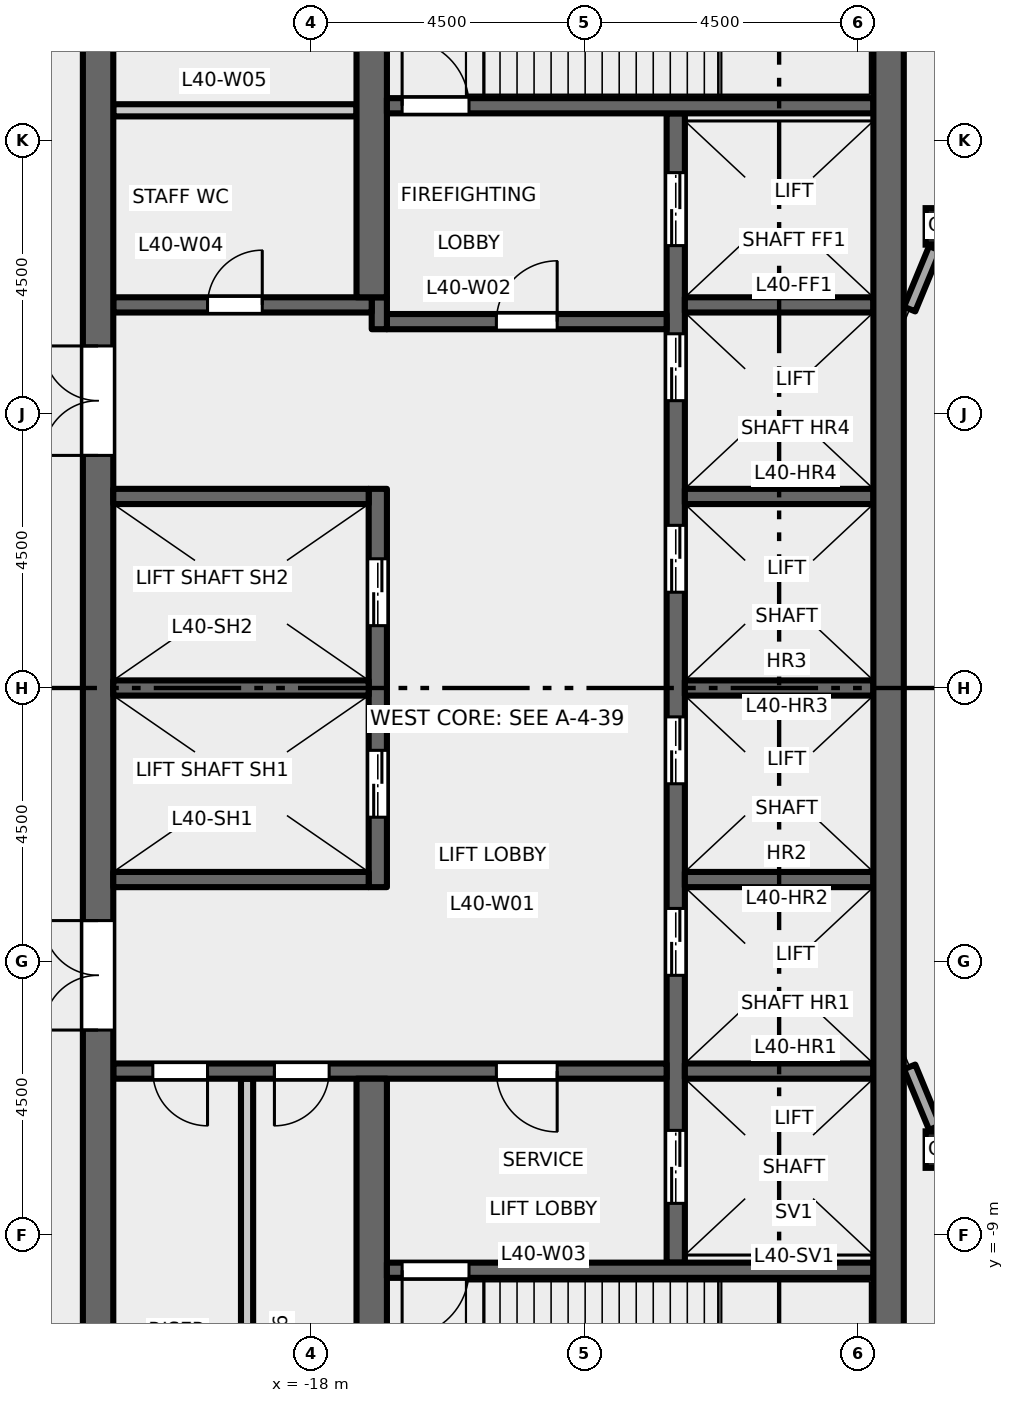
"""IFC4 building model, lengths in metres.
Left out: names, types, materials, properties, quantities, classifications, styles, units other than length and angle.
Written with IfcOpenShell. Run it as: python <this file> out.ifc"""

import sys

from ifc_helpers import new_model, si_unit, direction, frame, frame_2d, origin, origin_2d, place, context, subcontext, project, spatial, rectangle, hollow_rectangle, extrude, element, fill, save


model = new_model("IFC4")
c1 = context("Model", 3, precision=1e-05, world=origin(), true_north=direction((0.0, 1.0)))
c2 = subcontext(c1, "Body", "Model", "MODEL_VIEW")
j1 = project(units=[si_unit("LENGTHUNIT", "METRE"), si_unit("PLANEANGLEUNIT", "RADIAN")], contexts=[c1])
p1 = place(None, origin())
s1 = spatial("IfcSite", under=j1, at=p1, CompositionType="ELEMENT")
p2 = place(p1, origin())
s2 = spatial("IfcBuilding", under=s1, at=p2, CompositionType="ELEMENT")
p3 = place(p2, frame((0.0, 0.0, 187.2)))
s3 = spatial("IfcBuildingStorey", under=s2, at=p3, CompositionType="ELEMENT", Elevation=187.2)
for number, where, z_axis, x_axis in (
    (1, (-7.591, -7.591, 0.0), (0.0, 0.0, 1.0), (1.0, 0.0, 0.0)),
    (2, (-7.591, 7.591, 0.0), (0.0, 0.0, 1.0), (1.0, 0.0, 0.0)),
):
    element("IfcColumn", number, at=place(p3, frame(where, z_axis=z_axis, x_axis=x_axis)), inside=s3, PredefinedType="COLUMN", context=c2, shape_type="SweptSolid", body=[
        extrude(hollow_rectangle(XDim=0.6, YDim=0.6, WallThickness=0.032, at=origin_2d()), origin(), (0.0, 0.0, 1.0), 5.5),
    ])
p4 = place(p3, frame((-12.0, -9.45, 0.0), z_axis=(0.0, 0.0, 1.0), x_axis=(0.0, 1.0, 0.0)))
e3 = element("IfcWall", 3, at=p4, inside=s3, PredefinedType="SHEAR", context=c2, shape_type="SweptSolid", body=[
    extrude(rectangle(XDim=18.9, YDim=0.3, at=frame_2d((9.45, 0.0))), origin(), (0.0, 0.0, 1.0), 5.35),
])
p5 = place(p4, frame((4.725, 0.0, 0.0)))
e4 = element("IfcOpeningElement", 4, at=p5, cuts=e3, PredefinedType="OPENING", context=c2, shape_type="SweptSolid", body=[
    extrude(rectangle(XDim=1.1, YDim=2.1, at=frame_2d((0.55, 1.05))), frame((0.0, 0.16, 0.0), z_axis=(0.0, -1.0, 0.0), x_axis=(1.0, 0.0, 0.0)), (0.0, 0.0, 1.0), 0.32),
])
p6 = place(p4, frame((7.875, 0.0, 0.0)))
e5 = element("IfcOpeningElement", 5, at=p6, cuts=e3, PredefinedType="OPENING", context=c2, shape_type="SweptSolid", body=[
    extrude(rectangle(XDim=1.1, YDim=2.1, at=frame_2d((0.55, 1.05))), frame((0.0, 0.16, 0.0), z_axis=(0.0, -1.0, 0.0), x_axis=(1.0, 0.0, 0.0)), (0.0, 0.0, 1.0), 0.32),
])
p7 = place(p4, frame((11.025, 0.0, 0.0)))
e6 = element("IfcOpeningElement", 6, at=p7, cuts=e3, PredefinedType="OPENING", context=c2, shape_type="SweptSolid", body=[
    extrude(rectangle(XDim=1.1, YDim=2.1, at=frame_2d((0.55, 1.05))), frame((0.0, 0.16, 0.0), z_axis=(0.0, -1.0, 0.0), x_axis=(1.0, 0.0, 0.0)), (0.0, 0.0, 1.0), 0.32),
])
p8 = place(p4, frame((14.175, 0.0, 0.0)))
e7 = element("IfcOpeningElement", 7, at=p8, cuts=e3, PredefinedType="OPENING", context=c2, shape_type="SweptSolid", body=[
    extrude(rectangle(XDim=1.1, YDim=2.1, at=frame_2d((0.55, 1.05))), frame((0.0, 0.16, 0.0), z_axis=(0.0, -1.0, 0.0), x_axis=(1.0, 0.0, 0.0)), (0.0, 0.0, 1.0), 0.32),
])
p9 = place(p4, frame((16.725, 0.0, 0.0)))
e8 = element("IfcOpeningElement", 8, at=p9, cuts=e3, PredefinedType="OPENING", context=c2, shape_type="SweptSolid", body=[
    extrude(rectangle(XDim=1.2, YDim=2.1, at=frame_2d((0.6, 1.05))), frame((0.0, 0.16, 0.0), z_axis=(0.0, -1.0, 0.0), x_axis=(1.0, 0.0, 0.0)), (0.0, 0.0, 1.0), 0.32),
])
p10 = place(p4, frame((0.975, 0.0, 0.0)))
e9 = element("IfcOpeningElement", 9, at=p10, cuts=e3, PredefinedType="OPENING", context=c2, shape_type="SweptSolid", body=[
    extrude(rectangle(XDim=1.2, YDim=2.1, at=frame_2d((0.6, 1.05))), frame((0.0, 0.16, 0.0), z_axis=(0.0, -1.0, 0.0), x_axis=(1.0, 0.0, 0.0)), (0.0, 0.0, 1.0), 0.32),
])
p11 = place(p3, frame((-12.15, 6.025, 0.0), z_axis=(0.0, 0.0, 1.0), x_axis=(-1.0, 0.0, 0.0)))
e10 = element("IfcWall", 10, at=p11, inside=s3, PredefinedType="SHEAR", context=c2, shape_type="SweptSolid", body=[
    extrude(rectangle(XDim=4.6, YDim=0.25, at=frame_2d((2.3, 0.0))), origin(), (0.0, 0.0, 1.0), 5.35),
])
p12 = place(p11, frame((1.8, 0.0, 0.0)))
e11 = element("IfcOpeningElement", 11, at=p12, cuts=e10, PredefinedType="OPENING", context=c2, shape_type="SweptSolid", body=[
    extrude(rectangle(XDim=1.0, YDim=2.1, at=frame_2d((0.5, 1.05))), frame((0.0, 0.135, 0.0), z_axis=(0.0, -1.0, 0.0), x_axis=(1.0, 0.0, 0.0)), (0.0, 0.0, 1.0), 0.27),
])
p13 = place(p3, frame((-16.875, 5.9, 0.0), z_axis=(0.0, 0.0, 1.0), x_axis=(0.0, 1.0, 0.0)))
e12 = element("IfcWall", 12, at=p13, inside=s3, PredefinedType="SHEAR", context=c2, shape_type="SweptSolid", body=[
    extrude(rectangle(XDim=0.525, YDim=0.25, at=frame_2d((0.263, 0.0))), origin(), (0.0, 0.0, 1.0), 5.35),
])
p14 = place(p3, frame((-17.0, 6.3, 0.0), z_axis=(0.0, 0.0, 1.0), x_axis=(-1.0, 0.0, 0.0)))
e13 = element("IfcWall", 13, at=p14, inside=s3, PredefinedType="SHEAR", context=c2, shape_type="SweptSolid", body=[
    extrude(rectangle(XDim=4.25, YDim=0.25, at=frame_2d((2.125, 0.0))), origin(), (0.0, 0.0, 1.0), 5.35),
])
p15 = place(p14, frame((1.8, 0.0, 0.0)))
e14 = element("IfcOpeningElement", 14, at=p15, cuts=e13, PredefinedType="OPENING", context=c2, shape_type="SweptSolid", body=[
    extrude(rectangle(XDim=0.9, YDim=2.1, at=frame_2d((0.45, 1.05))), frame((0.0, 0.135, 0.0), z_axis=(0.0, -1.0, 0.0), x_axis=(1.0, 0.0, 0.0)), (0.0, 0.0, 1.0), 0.27),
])
p16 = place(p3, frame((-12.15, -6.3, 0.0), z_axis=(0.0, 0.0, 1.0), x_axis=(-1.0, 0.0, 0.0)))
e15 = element("IfcWall", 15, at=p16, inside=s3, PredefinedType="SHEAR", context=c2, shape_type="SweptSolid", body=[
    extrude(rectangle(XDim=9.1, YDim=0.25, at=frame_2d((4.55, 0.0))), origin(), (0.0, 0.0, 1.0), 5.35),
])
p17 = place(p16, frame((1.8, 0.0, 0.0)))
e16 = element("IfcOpeningElement", 16, at=p17, cuts=e15, PredefinedType="OPENING", context=c2, shape_type="SweptSolid", body=[
    extrude(rectangle(XDim=1.0, YDim=2.1, at=frame_2d((0.5, 1.05))), frame((0.0, 0.135, 0.0), z_axis=(0.0, -1.0, 0.0), x_axis=(1.0, 0.0, 0.0)), (0.0, 0.0, 1.0), 0.27),
])
p18 = place(p16, frame((5.55, 0.0, 0.0)))
e17 = element("IfcOpeningElement", 17, at=p18, cuts=e15, PredefinedType="OPENING", context=c2, shape_type="SweptSolid", body=[
    extrude(rectangle(XDim=0.9, YDim=2.1, at=frame_2d((0.45, 1.05))), frame((0.0, 0.135, 0.0), z_axis=(0.0, -1.0, 0.0), x_axis=(1.0, 0.0, 0.0)), (0.0, 0.0, 1.0), 0.27),
])
p19 = place(p16, frame((7.55, 0.0, 0.0)))
e18 = element("IfcOpeningElement", 18, at=p19, cuts=e15, PredefinedType="OPENING", context=c2, shape_type="SweptSolid", body=[
    extrude(rectangle(XDim=0.9, YDim=2.1, at=frame_2d((0.45, 1.05))), frame((0.0, 0.135, 0.0), z_axis=(0.0, -1.0, 0.0), x_axis=(1.0, 0.0, 0.0)), (0.0, 0.0, 1.0), 0.27),
])
p20 = place(p3, frame((-21.5, -13.0, 0.0), z_axis=(0.0, 0.0, 1.0), x_axis=(0.0, 1.0, 0.0)))
e19 = element("IfcWall", 19, at=p20, inside=s3, PredefinedType="SHEAR", context=c2, shape_type="SweptSolid", body=[
    extrude(rectangle(XDim=26.0, YDim=0.5, at=frame_2d((13.0, 0.0))), origin(), (0.0, 0.0, 1.0), 5.35),
])
p21 = place(p20, frame((16.825, 0.0, 0.0)))
e20 = element("IfcOpeningElement", 20, at=p21, cuts=e19, PredefinedType="OPENING", context=c2, shape_type="SweptSolid", body=[
    extrude(rectangle(XDim=1.8, YDim=2.1, at=frame_2d((0.9, 1.05))), frame((0.0, 0.26, 0.0), z_axis=(0.0, -1.0, 0.0), x_axis=(1.0, 0.0, 0.0)), (0.0, 0.0, 1.0), 0.52),
])
p22 = place(p20, frame((7.375, 0.0, 0.0)))
e21 = element("IfcOpeningElement", 21, at=p22, cuts=e19, PredefinedType="OPENING", context=c2, shape_type="SweptSolid", body=[
    extrude(rectangle(XDim=1.8, YDim=2.1, at=frame_2d((0.9, 1.05))), frame((0.0, 0.26, 0.0), z_axis=(0.0, -1.0, 0.0), x_axis=(1.0, 0.0, 0.0)), (0.0, 0.0, 1.0), 0.52),
])
p23 = place(p20, frame((23.8, 0.0, 0.0)))
e22 = element("IfcOpeningElement", 22, at=p23, cuts=e19, PredefinedType="OPENING", context=c2, shape_type="SweptSolid", body=[
    extrude(rectangle(XDim=0.9, YDim=2.1, at=frame_2d((0.45, 1.05))), frame((0.0, 0.26, 0.0), z_axis=(0.0, -1.0, 0.0), x_axis=(1.0, 0.0, 0.0)), (0.0, 0.0, 1.0), 0.52),
])
p24 = place(p3, frame((-17.25, 9.5, 0.0), z_axis=(0.0, 0.0, 1.0), x_axis=(-1.0, 0.0, 0.0)))
e23 = element("IfcWall", 23, at=p24, inside=s3, PredefinedType="PARTITIONING", context=c2, shape_type="SweptSolid", body=[
    extrude(rectangle(XDim=4.0, YDim=0.2, at=frame_2d((2.0, 0.0))), origin(), (0.0, 0.0, 1.0), 5.35),
])
p25 = place(p3, frame((-19.05, -13.0, 0.0), z_axis=(0.0, 0.0, 1.0), x_axis=(0.0, 1.0, 0.0)))
e24 = element("IfcWall", 24, at=p25, inside=s3, PredefinedType="PARTITIONING", context=c2, shape_type="SweptSolid", body=[
    extrude(rectangle(XDim=6.575, YDim=0.2, at=frame_2d((3.288, 0.0))), origin(), (0.0, 0.0, 1.0), 5.35),
])
p26 = place(p3, frame((-16.9, -3.275, 0.0), z_axis=(0.0, 0.0, 1.0), x_axis=(0.0, 1.0, 0.0)))
e25 = element("IfcWall", 25, at=p26, inside=s3, PredefinedType="SHEAR", context=c2, shape_type="SweptSolid", body=[
    extrude(rectangle(XDim=6.55, YDim=0.3, at=frame_2d((3.275, 0.0))), origin(), (0.0, 0.0, 1.0), 5.35),
])
p27 = place(p26, frame((1.15, 0.0, 0.0)))
e26 = element("IfcOpeningElement", 26, at=p27, cuts=e25, PredefinedType="OPENING", context=c2, shape_type="SweptSolid", body=[
    extrude(rectangle(XDim=1.1, YDim=2.1, at=frame_2d((0.55, 1.05))), frame((0.0, 0.16, 0.0), z_axis=(0.0, -1.0, 0.0), x_axis=(1.0, 0.0, 0.0)), (0.0, 0.0, 1.0), 0.32),
])
p28 = place(p26, frame((4.3, 0.0, 0.0)))
e27 = element("IfcOpeningElement", 27, at=p28, cuts=e25, PredefinedType="OPENING", context=c2, shape_type="SweptSolid", body=[
    extrude(rectangle(XDim=1.1, YDim=2.1, at=frame_2d((0.55, 1.05))), frame((0.0, 0.16, 0.0), z_axis=(0.0, -1.0, 0.0), x_axis=(1.0, 0.0, 0.0)), (0.0, 0.0, 1.0), 0.32),
])
for number, where, z_axis, x_axis in (
    (28, (-17.05, 0.0, 0.0), (0.0, 0.0, 1.0), (-1.0, 0.0, 0.0)),
    (29, (-17.05, 3.15, 0.0), (0.0, 0.0, 1.0), (-1.0, 0.0, 0.0)),
    (30, (-17.05, -3.15, 0.0), (0.0, 0.0, 1.0), (-1.0, 0.0, 0.0)),
):
    element("IfcWall", number, at=place(p3, frame(where, z_axis=z_axis, x_axis=x_axis)), inside=s3, PredefinedType="SHEAR", context=c2, shape_type="SweptSolid", body=[
        extrude(rectangle(XDim=4.2, YDim=0.25, at=frame_2d((2.1, 0.0))), origin(), (0.0, 0.0, 1.0), 5.35),
    ])
for number, where, z_axis, x_axis in (
    (31, (-17.0, 6.425, 0.0), (0.0, 0.0, 1.0), (0.0, 1.0, 0.0)),
    (32, (-17.0, -13.0, 0.0), (0.0, 0.0, 1.0), (0.0, 1.0, 0.0)),
):
    element("IfcWall", number, at=place(p3, frame(where, z_axis=z_axis, x_axis=x_axis)), inside=s3, PredefinedType="SHEAR", context=c2, shape_type="SweptSolid", body=[
        extrude(rectangle(XDim=6.575, YDim=0.5, at=frame_2d((3.288, 0.0))), origin(), (0.0, 0.0, 1.0), 5.35),
    ])
for number, where, z_axis, x_axis in (
    (33, (-8.75, 0.0, 0.0), (0.0, 0.0, 1.0), (-1.0, 0.0, 0.0)),
    (34, (-8.75, 3.15, 0.0), (0.0, 0.0, 1.0), (-1.0, 0.0, 0.0)),
    (35, (-8.75, 6.3, 0.0), (0.0, 0.0, 1.0), (-1.0, 0.0, 0.0)),
    (36, (-8.75, -3.15, 0.0), (0.0, 0.0, 1.0), (-1.0, 0.0, 0.0)),
    (37, (-8.75, -6.3, 0.0), (0.0, 0.0, 1.0), (-1.0, 0.0, 0.0)),
):
    element("IfcWall", number, at=place(p3, frame(where, z_axis=z_axis, x_axis=x_axis)), inside=s3, PredefinedType="SHEAR", context=c2, shape_type="SweptSolid", body=[
        extrude(rectangle(XDim=3.1, YDim=0.25, at=frame_2d((1.55, 0.0))), origin(), (0.0, 0.0, 1.0), 5.35),
    ])
p29 = place(p3, frame((-8.75, 9.575, 0.0), z_axis=(0.0, 0.0, 1.0), x_axis=(-1.0, 0.0, 0.0)))
e38 = element("IfcWall", 38, at=p29, inside=s3, PredefinedType="SHEAR", context=c2, shape_type="SweptSolid", body=[
    extrude(rectangle(XDim=8.0, YDim=0.25, at=frame_2d((4.0, 0.0))), origin(), (0.0, 0.0, 1.0), 5.35),
])
p30 = place(p29, frame((6.65, 0.0, 0.0)))
e39 = element("IfcOpeningElement", 39, at=p30, cuts=e38, PredefinedType="OPENING", context=c2, shape_type="SweptSolid", body=[
    extrude(rectangle(XDim=1.1, YDim=2.1, at=frame_2d((0.55, 1.05))), frame((0.0, 0.135, 0.0), z_axis=(0.0, -1.0, 0.0), x_axis=(1.0, 0.0, 0.0)), (0.0, 0.0, 1.0), 0.27),
])
p31 = place(p3, frame((-8.75, -9.575, 0.0), z_axis=(0.0, 0.0, 1.0), x_axis=(-1.0, 0.0, 0.0)))
e40 = element("IfcWall", 40, at=p31, inside=s3, PredefinedType="SHEAR", context=c2, shape_type="SweptSolid", body=[
    extrude(rectangle(XDim=8.0, YDim=0.25, at=frame_2d((4.0, 0.0))), origin(), (0.0, 0.0, 1.0), 5.35),
])
p32 = place(p31, frame((6.65, 0.0, 0.0)))
e41 = element("IfcOpeningElement", 41, at=p32, cuts=e40, PredefinedType="OPENING", context=c2, shape_type="SweptSolid", body=[
    extrude(rectangle(XDim=1.1, YDim=2.1, at=frame_2d((0.55, 1.05))), frame((0.0, 0.135, 0.0), z_axis=(0.0, -1.0, 0.0), x_axis=(1.0, 0.0, 0.0)), (0.0, 0.0, 1.0), 0.27),
])
p33 = place(p3, frame((-8.5, -13.0, 0.0), z_axis=(0.0, 0.0, 1.0), x_axis=(0.0, 1.0, 0.0)))
e42 = element("IfcWall", 42, at=p33, inside=s3, PredefinedType="SHEAR", context=c2, shape_type="SweptSolid", body=[
    extrude(rectangle(XDim=26.0, YDim=0.5, at=frame_2d((13.0, 0.0))), origin(), (0.0, 0.0, 1.0), 5.35),
])
for number, where, z_axis, x_axis in (
    (43, (-7.741, 7.229, 0.0), (0.0, 0.0, 1.0), (-0.383, -0.924, 0.0)),
    (44, (-8.154, -6.231, 0.0), (0.0, 0.0, 1.0), (0.383, -0.924, 0.0)),
):
    element("IfcWall", number, at=place(p3, frame(where, z_axis=z_axis, x_axis=x_axis)), inside=s3, PredefinedType="STANDARD", context=c2, shape_type="SweptSolid", body=[
        extrude(rectangle(XDim=1.08, YDim=0.2, at=frame_2d((0.54, 0.0))), origin(), (0.0, 0.0, 1.0), 4.918),
    ])
p34 = place(p12, origin())
e45 = element("IfcDoor", 45, at=p34, inside=s3, OperationType="SINGLE_SWING_LEFT", PredefinedType="DOOR", context=c2, shape_type="SweptSolid", body=[
    extrude(rectangle(XDim=1.0, YDim=2.1, at=frame_2d((0.5, 1.05))), frame((0.0, 0.025, 0.0), z_axis=(0.0, -1.0, 0.0), x_axis=(1.0, 0.0, 0.0)), (0.0, 0.0, 1.0), 0.05),
])
fill(e11, e45)
p35 = place(p17, origin())
e46 = element("IfcDoor", 46, at=p35, inside=s3, OperationType="SINGLE_SWING_RIGHT", PredefinedType="DOOR", context=c2, shape_type="SweptSolid", body=[
    extrude(rectangle(XDim=1.0, YDim=2.1, at=frame_2d((0.5, 1.05))), frame((0.0, 0.025, 0.0), z_axis=(0.0, -1.0, 0.0), x_axis=(1.0, 0.0, 0.0)), (0.0, 0.0, 1.0), 0.05),
])
fill(e16, e46)
p36 = place(p30, origin())
e47 = element("IfcDoor", 47, at=p36, inside=s3, OperationType="SINGLE_SWING_RIGHT", PredefinedType="DOOR", context=c2, shape_type="SweptSolid", body=[
    extrude(rectangle(XDim=1.1, YDim=2.1, at=frame_2d((0.55, 1.05))), frame((0.0, 0.025, 0.0), z_axis=(0.0, -1.0, 0.0), x_axis=(1.0, 0.0, 0.0)), (0.0, 0.0, 1.0), 0.05),
])
fill(e39, e47)
p37 = place(p32, origin())
e48 = element("IfcDoor", 48, at=p37, inside=s3, OperationType="SINGLE_SWING_LEFT", PredefinedType="DOOR", context=c2, shape_type="SweptSolid", body=[
    extrude(rectangle(XDim=1.1, YDim=2.1, at=frame_2d((0.55, 1.05))), frame((0.0, 0.025, 0.0), z_axis=(0.0, -1.0, 0.0), x_axis=(1.0, 0.0, 0.0)), (0.0, 0.0, 1.0), 0.05),
])
fill(e41, e48)
p38 = place(p21, origin())
e49 = element("IfcDoor", 49, at=p38, inside=s3, OperationType="DOUBLE_DOOR_DOUBLE_SWING", PredefinedType="DOOR", context=c2, shape_type="SweptSolid", body=[
    extrude(rectangle(XDim=1.8, YDim=2.1, at=frame_2d((0.9, 1.05))), frame((0.0, 0.025, 0.0), z_axis=(0.0, -1.0, 0.0), x_axis=(1.0, 0.0, 0.0)), (0.0, 0.0, 1.0), 0.05),
])
fill(e20, e49)
p39 = place(p22, origin())
e50 = element("IfcDoor", 50, at=p39, inside=s3, OperationType="DOUBLE_DOOR_DOUBLE_SWING", PredefinedType="DOOR", context=c2, shape_type="SweptSolid", body=[
    extrude(rectangle(XDim=1.8, YDim=2.1, at=frame_2d((0.9, 1.05))), frame((0.0, 0.025, 0.0), z_axis=(0.0, -1.0, 0.0), x_axis=(1.0, 0.0, 0.0)), (0.0, 0.0, 1.0), 0.05),
])
fill(e21, e50)
p40 = place(p5, origin())
e51 = element("IfcDoor", 51, at=p40, inside=s3, OperationType="DOUBLE_DOOR_SLIDING", PredefinedType="DOOR", context=c2, shape_type="SweptSolid", body=[
    extrude(rectangle(XDim=1.1, YDim=2.1, at=frame_2d((0.55, 1.05))), frame((0.0, 0.025, 0.0), z_axis=(0.0, -1.0, 0.0), x_axis=(1.0, 0.0, 0.0)), (0.0, 0.0, 1.0), 0.05),
])
fill(e4, e51)
p41 = place(p6, origin())
e52 = element("IfcDoor", 52, at=p41, inside=s3, OperationType="DOUBLE_DOOR_SLIDING", PredefinedType="DOOR", context=c2, shape_type="SweptSolid", body=[
    extrude(rectangle(XDim=1.1, YDim=2.1, at=frame_2d((0.55, 1.05))), frame((0.0, 0.025, 0.0), z_axis=(0.0, -1.0, 0.0), x_axis=(1.0, 0.0, 0.0)), (0.0, 0.0, 1.0), 0.05),
])
fill(e5, e52)
p42 = place(p7, origin())
e53 = element("IfcDoor", 53, at=p42, inside=s3, OperationType="DOUBLE_DOOR_SLIDING", PredefinedType="DOOR", context=c2, shape_type="SweptSolid", body=[
    extrude(rectangle(XDim=1.1, YDim=2.1, at=frame_2d((0.55, 1.05))), frame((0.0, 0.025, 0.0), z_axis=(0.0, -1.0, 0.0), x_axis=(1.0, 0.0, 0.0)), (0.0, 0.0, 1.0), 0.05),
])
fill(e6, e53)
p43 = place(p8, origin())
e54 = element("IfcDoor", 54, at=p43, inside=s3, OperationType="DOUBLE_DOOR_SLIDING", PredefinedType="DOOR", context=c2, shape_type="SweptSolid", body=[
    extrude(rectangle(XDim=1.1, YDim=2.1, at=frame_2d((0.55, 1.05))), frame((0.0, 0.025, 0.0), z_axis=(0.0, -1.0, 0.0), x_axis=(1.0, 0.0, 0.0)), (0.0, 0.0, 1.0), 0.05),
])
fill(e7, e54)
p44 = place(p27, origin())
e55 = element("IfcDoor", 55, at=p44, inside=s3, OperationType="DOUBLE_DOOR_SLIDING", PredefinedType="DOOR", context=c2, shape_type="SweptSolid", body=[
    extrude(rectangle(XDim=1.1, YDim=2.1, at=frame_2d((0.55, 1.05))), frame((0.0, 0.025, 0.0), z_axis=(0.0, -1.0, 0.0), x_axis=(1.0, 0.0, 0.0)), (0.0, 0.0, 1.0), 0.05),
])
fill(e26, e55)
p45 = place(p28, origin())
e56 = element("IfcDoor", 56, at=p45, inside=s3, OperationType="DOUBLE_DOOR_SLIDING", PredefinedType="DOOR", context=c2, shape_type="SweptSolid", body=[
    extrude(rectangle(XDim=1.1, YDim=2.1, at=frame_2d((0.55, 1.05))), frame((0.0, 0.025, 0.0), z_axis=(0.0, -1.0, 0.0), x_axis=(1.0, 0.0, 0.0)), (0.0, 0.0, 1.0), 0.05),
])
fill(e27, e56)
p46 = place(p9, origin())
e57 = element("IfcDoor", 57, at=p46, inside=s3, OperationType="DOUBLE_DOOR_SLIDING", PredefinedType="DOOR", context=c2, shape_type="SweptSolid", body=[
    extrude(rectangle(XDim=1.2, YDim=2.1, at=frame_2d((0.6, 1.05))), frame((0.0, 0.025, 0.0), z_axis=(0.0, -1.0, 0.0), x_axis=(1.0, 0.0, 0.0)), (0.0, 0.0, 1.0), 0.05),
])
fill(e8, e57)
p47 = place(p10, origin())
e58 = element("IfcDoor", 58, at=p47, inside=s3, OperationType="DOUBLE_DOOR_SLIDING", PredefinedType="DOOR", context=c2, shape_type="SweptSolid", body=[
    extrude(rectangle(XDim=1.2, YDim=2.1, at=frame_2d((0.6, 1.05))), frame((0.0, 0.025, 0.0), z_axis=(0.0, -1.0, 0.0), x_axis=(1.0, 0.0, 0.0)), (0.0, 0.0, 1.0), 0.05),
])
fill(e9, e58)
p48 = place(p15, origin())
e59 = element("IfcDoor", 59, at=p48, inside=s3, OperationType="SINGLE_SWING_LEFT", PredefinedType="DOOR", context=c2, shape_type="SweptSolid", body=[
    extrude(rectangle(XDim=0.9, YDim=2.1, at=frame_2d((0.45, 1.05))), frame((0.0, 0.025, 0.0), z_axis=(0.0, -1.0, 0.0), x_axis=(1.0, 0.0, 0.0)), (0.0, 0.0, 1.0), 0.05),
])
fill(e14, e59)
p49 = place(p18, origin())
e60 = element("IfcDoor", 60, at=p49, inside=s3, OperationType="SINGLE_SWING_LEFT", PredefinedType="DOOR", context=c2, shape_type="SweptSolid", body=[
    extrude(rectangle(XDim=0.9, YDim=2.1, at=frame_2d((0.45, 1.05))), frame((0.0, 0.025, 0.0), z_axis=(0.0, -1.0, 0.0), x_axis=(1.0, 0.0, 0.0)), (0.0, 0.0, 1.0), 0.05),
])
fill(e17, e60)
p50 = place(p19, origin())
e61 = element("IfcDoor", 61, at=p50, inside=s3, OperationType="SINGLE_SWING_RIGHT", PredefinedType="DOOR", context=c2, shape_type="SweptSolid", body=[
    extrude(rectangle(XDim=0.9, YDim=2.1, at=frame_2d((0.45, 1.05))), frame((0.0, 0.025, 0.0), z_axis=(0.0, -1.0, 0.0), x_axis=(1.0, 0.0, 0.0)), (0.0, 0.0, 1.0), 0.05),
])
fill(e18, e61)
save(model, sys.argv[1])
